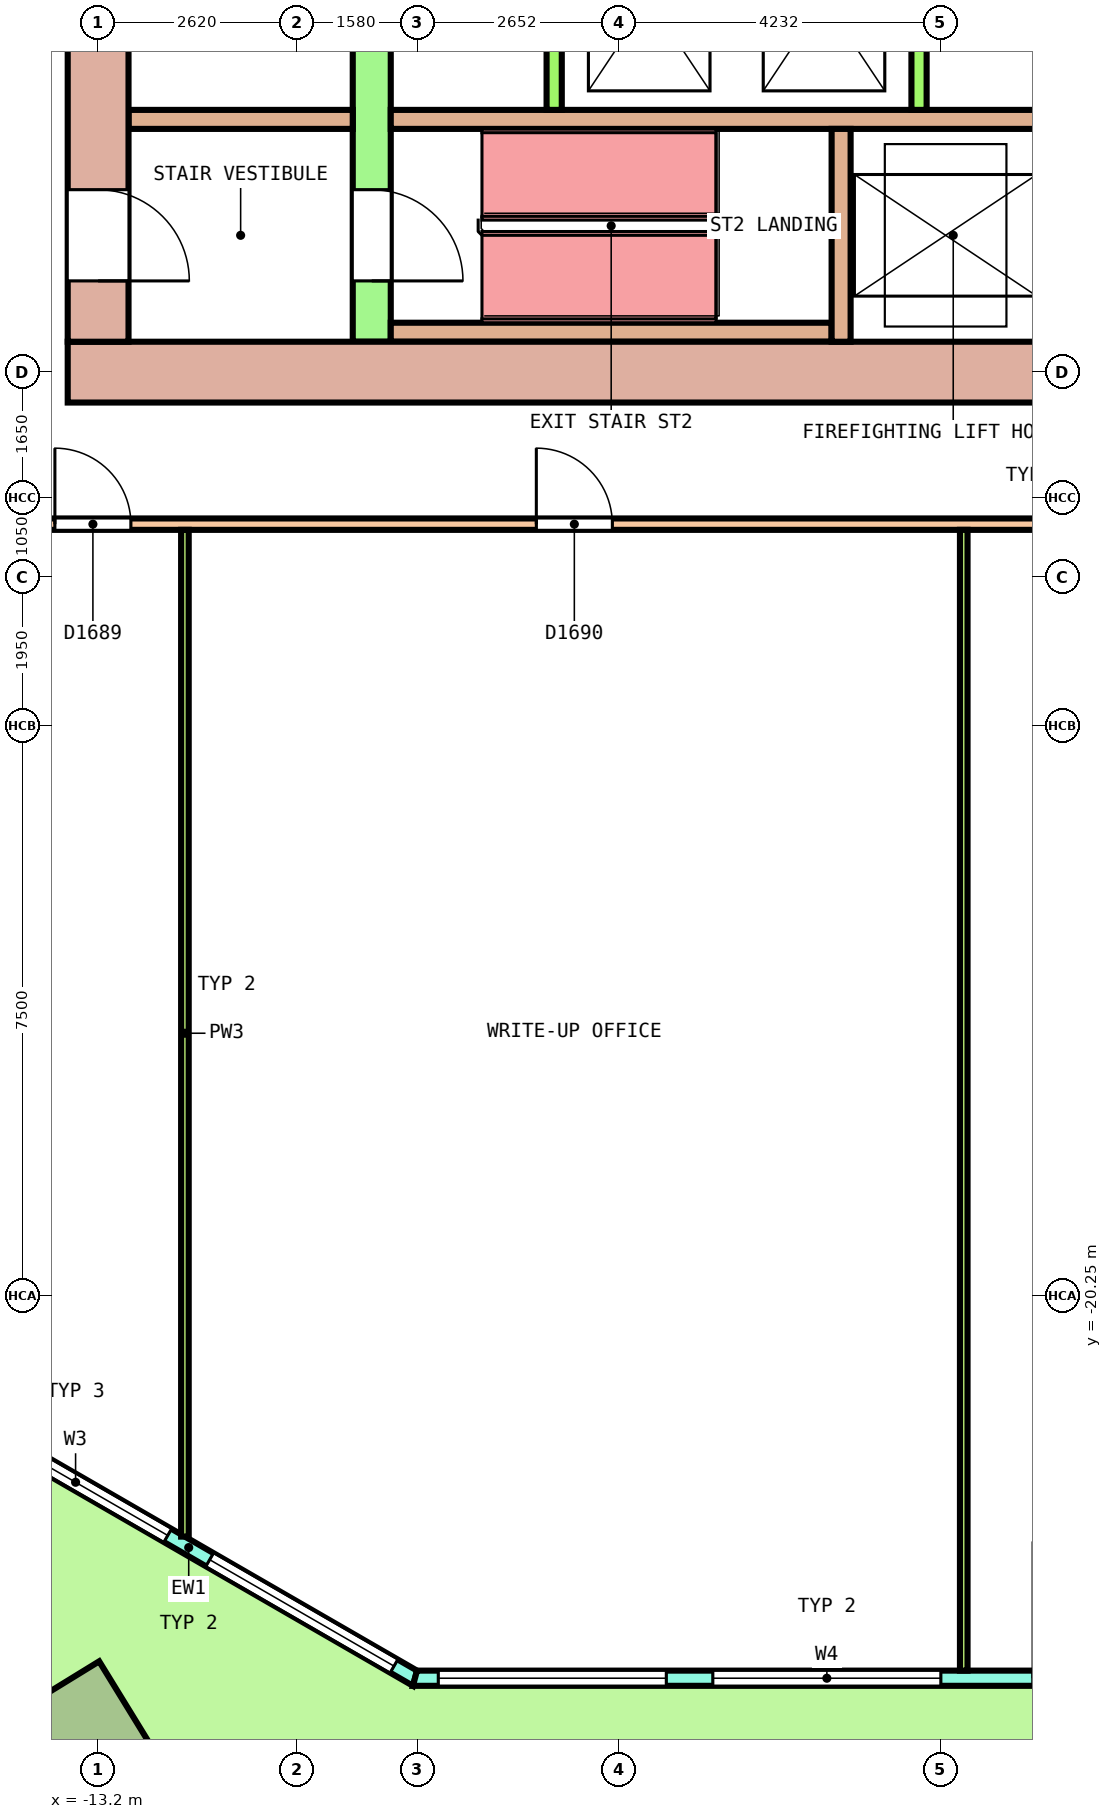
"""IFC4 building model, lengths in metres.
Left out: names, types, materials, properties, quantities, classifications, styles, units other than length and angle.
Written with IfcOpenShell. Run it as: python <this file> out.ifc"""

import sys

from ifc_helpers import new_model, si_unit, direction, frame, frame_2d, origin, origin_2d, place, context, subcontext, project, spatial, polyline, rectangle, outline, extrude, element, fill, save


model = new_model("IFC4")
c1 = context("Model", 3, precision=1e-05, world=origin(), true_north=direction((0.0, 1.0)))
c2 = subcontext(c1, "Body", "Model", "MODEL_VIEW")
j1 = project(units=[si_unit("LENGTHUNIT", "METRE"), si_unit("PLANEANGLEUNIT", "RADIAN")], contexts=[c1])
p1 = place(None, origin())
s1 = spatial("IfcSite", under=j1, at=p1, CompositionType="ELEMENT")
p2 = place(p1, origin())
s2 = spatial("IfcBuilding", under=s1, at=p2, CompositionType="ELEMENT")
p3 = place(p2, frame((0.0, 0.0, 135.2)))
s3 = spatial("IfcBuildingStorey", under=s2, at=p3, CompositionType="ELEMENT", Elevation=135.2)
p4 = place(p3, frame((-13.408, -25.989, 0.0), z_axis=(-0.170530004844, 0.295445221584, 0.940016828834), x_axis=(0.853708362876, -0.432077398315, 0.29067361941)))
e1 = element("IfcColumn", 1, at=p4, inside=s3, PredefinedType="COLUMN", context=c2, shape_type="SweptSolid", body=[
    extrude(rectangle(XDim=1.35, YDim=1.35, at=origin_2d()), origin(), (0.0, 0.0, 1.0), 4.298),
])
p5 = place(p3, frame((-14.985, -21.845, 0.0), z_axis=(0.0, 0.0, 1.0), x_axis=(0.866029458321, -0.49999297727, 0.0)))
e2 = element("IfcWall", 2, at=p5, inside=s3, PredefinedType="SOLIDWALL", context=c2, shape_type="SweptSolid", body=[
    extrude(outline(polyline([(-0.027, -0.1), (1.128, -0.1), (2.282, -0.1), (3.437, -0.1), (4.592, -0.1), (5.747, -0.1), (6.901, -0.1), (6.848, 0.1), (5.711, 0.1), (4.574, 0.1), (3.437, 0.1), (2.301, 0.1), (1.164, 0.1), (0.027, 0.1), (-0.027, -0.1)])), origin(), (0.0, 0.0, 1.0), 4.1),
])
p6 = place(p5, frame((0.319, 0.0, 0.1)))
e3 = element("IfcOpeningElement", 3, at=p6, cuts=e2, PredefinedType="OPENING", context=c2, shape_type="SweptSolid", body=[
    extrude(rectangle(XDim=2.8, YDim=2.9, at=frame_2d((1.4, 1.45))), frame((0.0, 0.11, 0.0), z_axis=(0.0, -1.0, 0.0), x_axis=(1.0, 0.0, 0.0)), (0.0, 0.0, 1.0), 0.22),
])
p7 = place(p5, frame((3.756, 0.0, 0.1)))
e4 = element("IfcOpeningElement", 4, at=p7, cuts=e2, PredefinedType="OPENING", context=c2, shape_type="SweptSolid", body=[
    extrude(rectangle(XDim=2.8, YDim=2.9, at=frame_2d((1.4, 1.45))), frame((0.0, 0.11, 0.0), z_axis=(0.0, -1.0, 0.0), x_axis=(1.0, 0.0, 0.0)), (0.0, 0.0, 1.0), 0.22),
])
p8 = place(p3, frame((-9.031, -25.283, 0.0), z_axis=(0.0, 0.0, 1.0), x_axis=(1.0, 0.0, 0.0)))
e5 = element("IfcWall", 5, at=p8, inside=s3, PredefinedType="SOLIDWALL", context=c2, shape_type="SweptSolid", body=[
    extrude(outline(polyline([(-0.027, -0.1), (0.979, -0.1), (1.986, -0.1), (2.992, -0.1), (3.999, -0.1), (5.005, -0.1), (6.012, -0.1), (7.018, -0.1), (8.025, -0.1), (9.031, -0.1), (10.038, -0.1), (11.044, -0.1), (12.051, -0.1), (13.057, -0.1), (14.063, -0.1), (15.07, -0.1), (16.076, -0.1), (17.083, -0.1), (18.089, -0.1), (18.036, 0.1), (17.035, 0.1), (16.035, 0.1), (15.034, 0.1), (14.034, 0.1), (13.033, 0.1), (12.033, 0.1), (11.032, 0.1), (10.032, 0.1), (9.031, 0.1), (8.031, 0.1), (7.03, 0.1), (6.03, 0.1), (5.029, 0.1), (4.029, 0.1), (3.028, 0.1), (2.028, 0.1), (1.027, 0.1), (0.027, 0.1), (-0.027, -0.1)])), origin(), (0.0, 0.0, 1.0), 4.1),
])
p9 = place(p8, frame((0.306, 0.0, 0.1)))
e6 = element("IfcOpeningElement", 6, at=p9, cuts=e5, PredefinedType="OPENING", context=c2, shape_type="SweptSolid", body=[
    extrude(rectangle(XDim=3.0, YDim=2.9, at=frame_2d((1.5, 1.45))), frame((0.0, 0.11, 0.0), z_axis=(0.0, -1.0, 0.0), x_axis=(1.0, 0.0, 0.0)), (0.0, 0.0, 1.0), 0.22),
])
p10 = place(p8, frame((3.919, 0.0, 0.1)))
e7 = element("IfcOpeningElement", 7, at=p10, cuts=e5, PredefinedType="OPENING", context=c2, shape_type="SweptSolid", body=[
    extrude(rectangle(XDim=3.0, YDim=2.9, at=frame_2d((1.5, 1.45))), frame((0.0, 0.11, 0.0), z_axis=(0.0, -1.0, 0.0), x_axis=(1.0, 0.0, 0.0)), (0.0, 0.0, 1.0), 0.22),
])
p11 = place(p8, frame((8.131, 0.0, 0.0)))
e8 = element("IfcOpeningElement", 8, at=p11, cuts=e5, PredefinedType="OPENING", context=c2, shape_type="SweptSolid", body=[
    extrude(rectangle(XDim=1.8, YDim=2.4, at=frame_2d((0.9, 1.2))), frame((0.0, 0.11, 0.0), z_axis=(0.0, -1.0, 0.0), x_axis=(1.0, 0.0, 0.0)), (0.0, 0.0, 1.0), 0.22),
])
p12 = place(p8, frame((8.131, 0.0, 2.55)))
e9 = element("IfcOpeningElement", 9, at=p12, cuts=e5, PredefinedType="OPENING", context=c2, shape_type="SweptSolid", body=[
    extrude(rectangle(XDim=1.8, YDim=0.45, at=frame_2d((0.9, 0.225))), frame((0.0, 0.11, 0.0), z_axis=(0.0, -1.0, 0.0), x_axis=(1.0, 0.0, 0.0)), (0.0, 0.0, 1.0), 0.22),
])
p13 = place(p8, frame((11.144, 0.0, 0.1)))
e10 = element("IfcOpeningElement", 10, at=p13, cuts=e5, PredefinedType="OPENING", context=c2, shape_type="SweptSolid", body=[
    extrude(rectangle(XDim=3.0, YDim=2.9, at=frame_2d((1.5, 1.45))), frame((0.0, 0.11, 0.0), z_axis=(0.0, -1.0, 0.0), x_axis=(1.0, 0.0, 0.0)), (0.0, 0.0, 1.0), 0.22),
])
p14 = place(p8, frame((14.756, 0.0, 0.1)))
e11 = element("IfcOpeningElement", 11, at=p14, cuts=e5, PredefinedType="OPENING", context=c2, shape_type="SweptSolid", body=[
    extrude(rectangle(XDim=3.0, YDim=2.9, at=frame_2d((1.5, 1.45))), frame((0.0, 0.11, 0.0), z_axis=(0.0, -1.0, 0.0), x_axis=(1.0, 0.0, 0.0)), (0.0, 0.0, 1.0), 0.22),
])
p15 = place(p3, frame((-13.6, -8.1, 0.0), z_axis=(0.0, 0.0, 1.0), x_axis=(1.0, 0.0, 0.0)))
e12 = element("IfcWall", 12, at=p15, inside=s3, PredefinedType="SHEAR", context=c2, shape_type="SweptSolid", body=[
    extrude(rectangle(XDim=27.2, YDim=0.8, at=frame_2d((13.6, 0.0))), origin(), (0.0, 0.0, 1.0), 4.1),
])
p16 = place(p15, frame((15.15, 0.0, 0.0)))
e13 = element("IfcOpeningElement", 13, at=p16, cuts=e12, PredefinedType="OPENING", context=c2, shape_type="SweptSolid", body=[
    extrude(rectangle(XDim=1.2, YDim=2.1, at=frame_2d((0.6, 1.05))), frame((0.0, 0.41, 0.0), z_axis=(0.0, -1.0, 0.0), x_axis=(1.0, 0.0, 0.0)), (0.0, 0.0, 1.0), 0.82),
])
p17 = place(p3, frame((-13.2, -7.7, 0.0), z_axis=(0.0, 0.0, 1.0), x_axis=(0.0, 1.0, 0.0)))
e14 = element("IfcWall", 14, at=p17, inside=s3, PredefinedType="SHEAR", context=c2, shape_type="SweptSolid", body=[
    extrude(rectangle(XDim=15.4, YDim=0.8, at=frame_2d((7.7, 0.0))), origin(), (0.0, 0.0, 1.0), 4.1),
])
p18 = place(p17, frame((6.5, 0.0, 0.0)))
e15 = element("IfcOpeningElement", 15, at=p18, cuts=e14, PredefinedType="OPENING", context=c2, shape_type="SweptSolid", body=[
    extrude(rectangle(XDim=2.4, YDim=2.1, at=frame_2d((1.2, 1.05))), frame((0.0, 0.41, 0.0), z_axis=(0.0, -1.0, 0.0), x_axis=(1.0, 0.0, 0.0)), (0.0, 0.0, 1.0), 0.82),
])
p19 = place(p17, frame((13.4, 0.0, 0.0)))
e16 = element("IfcOpeningElement", 16, at=p19, cuts=e14, PredefinedType="OPENING", context=c2, shape_type="SweptSolid", body=[
    extrude(rectangle(XDim=1.2, YDim=2.1, at=frame_2d((0.6, 1.05))), frame((0.0, 0.41, 0.0), z_axis=(0.0, -1.0, 0.0), x_axis=(1.0, 0.0, 0.0)), (0.0, 0.0, 1.0), 0.82),
])
p20 = place(p17, frame((0.8, 0.0, 0.0)))
e17 = element("IfcOpeningElement", 17, at=p20, cuts=e14, PredefinedType="OPENING", context=c2, shape_type="SweptSolid", body=[
    extrude(rectangle(XDim=1.2, YDim=2.1, at=frame_2d((0.6, 1.05))), frame((0.0, 0.41, 0.0), z_axis=(0.0, -1.0, 0.0), x_axis=(1.0, 0.0, 0.0)), (0.0, 0.0, 1.0), 0.82),
])
p21 = place(p3, frame((-9.6, -7.7, 0.0), z_axis=(0.0, 0.0, 1.0), x_axis=(0.0, 1.0, 0.0)))
e18 = element("IfcWall", 18, at=p21, inside=s3, PredefinedType="SHEAR", context=c2, shape_type="SweptSolid", body=[
    extrude(rectangle(XDim=15.4, YDim=0.5, at=frame_2d((7.7, 0.0))), origin(), (0.0, 0.0, 1.0), 4.1),
])
p22 = place(p21, frame((6.5, 0.0, 0.0)))
e19 = element("IfcOpeningElement", 19, at=p22, cuts=e18, PredefinedType="OPENING", context=c2, shape_type="SweptSolid", body=[
    extrude(rectangle(XDim=2.4, YDim=2.1, at=frame_2d((1.2, 1.05))), frame((0.0, 0.26, 0.0), z_axis=(0.0, -1.0, 0.0), x_axis=(1.0, 0.0, 0.0)), (0.0, 0.0, 1.0), 0.52),
])
p23 = place(p21, frame((13.4, 0.0, 0.0)))
e20 = element("IfcOpeningElement", 20, at=p23, cuts=e18, PredefinedType="OPENING", context=c2, shape_type="SweptSolid", body=[
    extrude(rectangle(XDim=1.2, YDim=2.1, at=frame_2d((0.6, 1.05))), frame((0.0, 0.26, 0.0), z_axis=(0.0, -1.0, 0.0), x_axis=(1.0, 0.0, 0.0)), (0.0, 0.0, 1.0), 0.52),
])
p24 = place(p21, frame((0.8, 0.0, 0.0)))
e21 = element("IfcOpeningElement", 21, at=p24, cuts=e18, PredefinedType="OPENING", context=c2, shape_type="SweptSolid", body=[
    extrude(rectangle(XDim=1.2, YDim=2.1, at=frame_2d((0.6, 1.05))), frame((0.0, 0.26, 0.0), z_axis=(0.0, -1.0, 0.0), x_axis=(1.0, 0.0, 0.0)), (0.0, 0.0, 1.0), 0.52),
])
p25 = place(p3, frame((-12.8, -4.775, 0.0), z_axis=(0.0, 0.0, 1.0), x_axis=(1.0, 0.0, 0.0)))
e22 = element("IfcWall", 22, at=p25, inside=s3, PredefinedType="SOLIDWALL", context=c2, shape_type="SweptSolid", body=[
    extrude(rectangle(XDim=2.95, YDim=0.25, at=frame_2d((1.475, 0.0))), origin(), (0.0, 0.0, 1.0), 4.1),
])
p26 = place(p3, frame((-9.35, -4.775, 0.0), z_axis=(0.0, 0.0, 1.0), x_axis=(1.0, 0.0, 0.0)))
e23 = element("IfcWall", 23, at=p26, inside=s3, PredefinedType="SOLIDWALL", context=c2, shape_type="SweptSolid", body=[
    extrude(rectangle(XDim=18.7, YDim=0.25, at=frame_2d((9.35, 0.0))), origin(), (0.0, 0.0, 1.0), 4.1),
])
for number, where, z_axis, x_axis in (
    (24, (-7.2, -4.65, 0.0), (0.0, 0.0, 1.0), (0.0, 1.0, 0.0)),
    (25, (-2.4, -4.65, 0.0), (0.0, 0.0, 1.0), (0.0, 1.0, 0.0)),
):
    element("IfcWall", number, at=place(p3, frame(where, z_axis=z_axis, x_axis=x_axis)), inside=s3, PredefinedType="SOLIDWALL", context=c2, shape_type="SweptSolid", body=[
        extrude(rectangle(XDim=2.9, YDim=0.2, at=frame_2d((1.45, 0.0))), origin(), (0.0, 0.0, 1.0), 4.1),
    ])
p27 = place(p3, frame((-9.35, -7.575, 0.0), z_axis=(0.0, 0.0, 1.0), x_axis=(1.0, 0.0, 0.0)))
e26 = element("IfcWall", 26, at=p27, inside=s3, PredefinedType="SOLIDWALL", context=c2, shape_type="SweptSolid", body=[
    extrude(rectangle(XDim=5.8, YDim=0.25, at=frame_2d((2.9, 0.0))), origin(), (0.0, 0.0, 1.0), 4.1),
])
p28 = place(p3, frame((-3.425, -7.7, 0.0), z_axis=(0.0, 0.0, 1.0), x_axis=(0.0, 1.0, 0.0)))
e27 = element("IfcWall", 27, at=p28, inside=s3, PredefinedType="SOLIDWALL", context=c2, shape_type="SweptSolid", body=[
    extrude(rectangle(XDim=2.8, YDim=0.25, at=frame_2d((1.4, 0.0))), origin(), (0.0, 0.0, 1.0), 4.1),
])
p29 = place(p3, frame((-15.275, -10.1, 0.0), z_axis=(0.0, 0.0, 1.0), x_axis=(1.0, 0.0, 0.0)))
e28 = element("IfcWall", 28, at=p29, inside=s3, PredefinedType="PARTITIONING", context=c2, shape_type="SweptSolid", body=[
    extrude(rectangle(XDim=30.4, YDim=0.15, at=frame_2d((15.2, 0.0))), origin(), (0.0, 0.0, 1.0), 3.05),
])
p30 = place(p29, frame((1.506, 0.0, 0.0)))
e29 = element("IfcOpeningElement", 29, at=p30, cuts=e28, PredefinedType="OPENING", context=c2, shape_type="SweptSolid", body=[
    extrude(rectangle(XDim=1.0, YDim=2.1, at=frame_2d((0.5, 1.05))), frame((0.0, 0.085, 0.0), z_axis=(0.0, -1.0, 0.0), x_axis=(1.0, 0.0, 0.0)), (0.0, 0.0, 1.0), 0.17),
])
p31 = place(p29, frame((7.84, 0.0, 0.0)))
e30 = element("IfcOpeningElement", 30, at=p31, cuts=e28, PredefinedType="OPENING", context=c2, shape_type="SweptSolid", body=[
    extrude(rectangle(XDim=1.0, YDim=2.1, at=frame_2d((0.5, 1.05))), frame((0.0, 0.085, 0.0), z_axis=(0.0, -1.0, 0.0), x_axis=(1.0, 0.0, 0.0)), (0.0, 0.0, 1.0), 0.17),
])
p32 = place(p29, frame((15.685, 0.0, 0.0)))
e31 = element("IfcOpeningElement", 31, at=p32, cuts=e28, PredefinedType="OPENING", context=c2, shape_type="SweptSolid", body=[
    extrude(rectangle(XDim=1.2, YDim=2.1, at=frame_2d((0.6, 1.05))), frame((0.0, 0.085, 0.0), z_axis=(0.0, -1.0, 0.0), x_axis=(1.0, 0.0, 0.0)), (0.0, 0.0, 1.0), 0.17),
])
p33 = place(p29, frame((23.812, 0.0, 0.0)))
e32 = element("IfcOpeningElement", 32, at=p33, cuts=e28, PredefinedType="OPENING", context=c2, shape_type="SweptSolid", body=[
    extrude(rectangle(XDim=1.2, YDim=2.1, at=frame_2d((0.6, 1.05))), frame((0.0, 0.085, 0.0), z_axis=(0.0, -1.0, 0.0), x_axis=(1.0, 0.0, 0.0)), (0.0, 0.0, 1.0), 0.17),
])
p34 = place(p3, frame((-12.058, -23.42, 0.0), z_axis=(0.0, 0.0, 1.0), x_axis=(0.0, 1.0, 0.0)))
e33 = element("IfcWall", 33, at=p34, inside=s3, PredefinedType="PARTITIONING", context=c2, shape_type="SweptSolid", body=[
    extrude(rectangle(XDim=13.245, YDim=0.1, at=frame_2d((6.623, 0.0))), origin(), (0.0, 0.0, 1.0), 3.05),
])
p35 = place(p3, frame((-1.812, -25.183, 0.0), z_axis=(0.0, 0.0, 1.0), x_axis=(0.0, 1.0, 0.0)))
e34 = element("IfcWall", 34, at=p35, inside=s3, PredefinedType="PARTITIONING", context=c2, shape_type="SweptSolid", body=[
    extrude(rectangle(XDim=15.008, YDim=0.1, at=frame_2d((7.504, 0.0))), origin(), (0.0, 0.0, 1.0), 3.05),
])
p36 = place(p6, origin())
e35 = element("IfcWindow", 35, at=p36, inside=s3, PartitioningType="SINGLE_PANEL", PredefinedType="WINDOW", context=c2, shape_type="SweptSolid", body=[
    extrude(rectangle(XDim=2.8, YDim=2.9, at=frame_2d((1.4, 1.45))), frame((0.0, 0.03, 0.0), z_axis=(0.0, -1.0, 0.0), x_axis=(1.0, 0.0, 0.0)), (0.0, 0.0, 1.0), 0.06),
])
fill(e3, e35)
p37 = place(p7, origin())
e36 = element("IfcWindow", 36, at=p37, inside=s3, PartitioningType="SINGLE_PANEL", PredefinedType="WINDOW", context=c2, shape_type="SweptSolid", body=[
    extrude(rectangle(XDim=2.8, YDim=2.9, at=frame_2d((1.4, 1.45))), frame((0.0, 0.03, 0.0), z_axis=(0.0, -1.0, 0.0), x_axis=(1.0, 0.0, 0.0)), (0.0, 0.0, 1.0), 0.06),
])
fill(e4, e36)
p38 = place(p9, origin())
e37 = element("IfcWindow", 37, at=p38, inside=s3, PartitioningType="SINGLE_PANEL", PredefinedType="WINDOW", context=c2, shape_type="SweptSolid", body=[
    extrude(rectangle(XDim=3.0, YDim=2.9, at=frame_2d((1.5, 1.45))), frame((0.0, 0.03, 0.0), z_axis=(0.0, -1.0, 0.0), x_axis=(1.0, 0.0, 0.0)), (0.0, 0.0, 1.0), 0.06),
])
fill(e6, e37)
p39 = place(p10, origin())
e38 = element("IfcWindow", 38, at=p39, inside=s3, PartitioningType="SINGLE_PANEL", PredefinedType="WINDOW", context=c2, shape_type="SweptSolid", body=[
    extrude(rectangle(XDim=3.0, YDim=2.9, at=frame_2d((1.5, 1.45))), frame((0.0, 0.03, 0.0), z_axis=(0.0, -1.0, 0.0), x_axis=(1.0, 0.0, 0.0)), (0.0, 0.0, 1.0), 0.06),
])
fill(e7, e38)
p40 = place(p24, origin())
e39 = element("IfcDoor", 39, at=p40, inside=s3, OperationType="SINGLE_SWING_RIGHT", PredefinedType="DOOR", context=c2, shape_type="SweptSolid", body=[
    extrude(rectangle(XDim=1.2, YDim=2.1, at=frame_2d((0.6, 1.05))), frame((0.0, 0.2, 0.0), z_axis=(0.0, -1.0, 0.0), x_axis=(1.0, 0.0, 0.0)), (0.0, 0.0, 1.0), 0.4),
])
fill(e21, e39)
p41 = place(p20, origin())
e40 = element("IfcDoor", 40, at=p41, inside=s3, OperationType="SINGLE_SWING_LEFT", PredefinedType="DOOR", context=c2, shape_type="SweptSolid", body=[
    extrude(rectangle(XDim=1.2, YDim=2.1, at=frame_2d((0.6, 1.05))), frame((0.0, 0.3, 0.0), z_axis=(0.0, -1.0, 0.0), x_axis=(1.0, 0.0, 0.0)), (0.0, 0.0, 1.0), 0.6),
])
fill(e17, e40)
p42 = place(p30, origin())
e41 = element("IfcDoor", 41, at=p42, inside=s3, OperationType="SINGLE_SWING_RIGHT", PredefinedType="DOOR", context=c2, shape_type="SweptSolid", body=[
    extrude(rectangle(XDim=1.0, YDim=2.1, at=frame_2d((0.5, 1.05))), frame((0.0, 0.025, 0.0), z_axis=(0.0, -1.0, 0.0), x_axis=(1.0, 0.0, 0.0)), (0.0, 0.0, 1.0), 0.05),
])
fill(e29, e41)
p43 = place(p31, origin())
e42 = element("IfcDoor", 42, at=p43, inside=s3, OperationType="SINGLE_SWING_LEFT", PredefinedType="DOOR", context=c2, shape_type="SweptSolid", body=[
    extrude(rectangle(XDim=1.0, YDim=2.1, at=frame_2d((0.5, 1.05))), frame((0.0, 0.025, 0.0), z_axis=(0.0, -1.0, 0.0), x_axis=(1.0, 0.0, 0.0)), (0.0, 0.0, 1.0), 0.05),
])
fill(e30, e42)
save(model, sys.argv[1])
